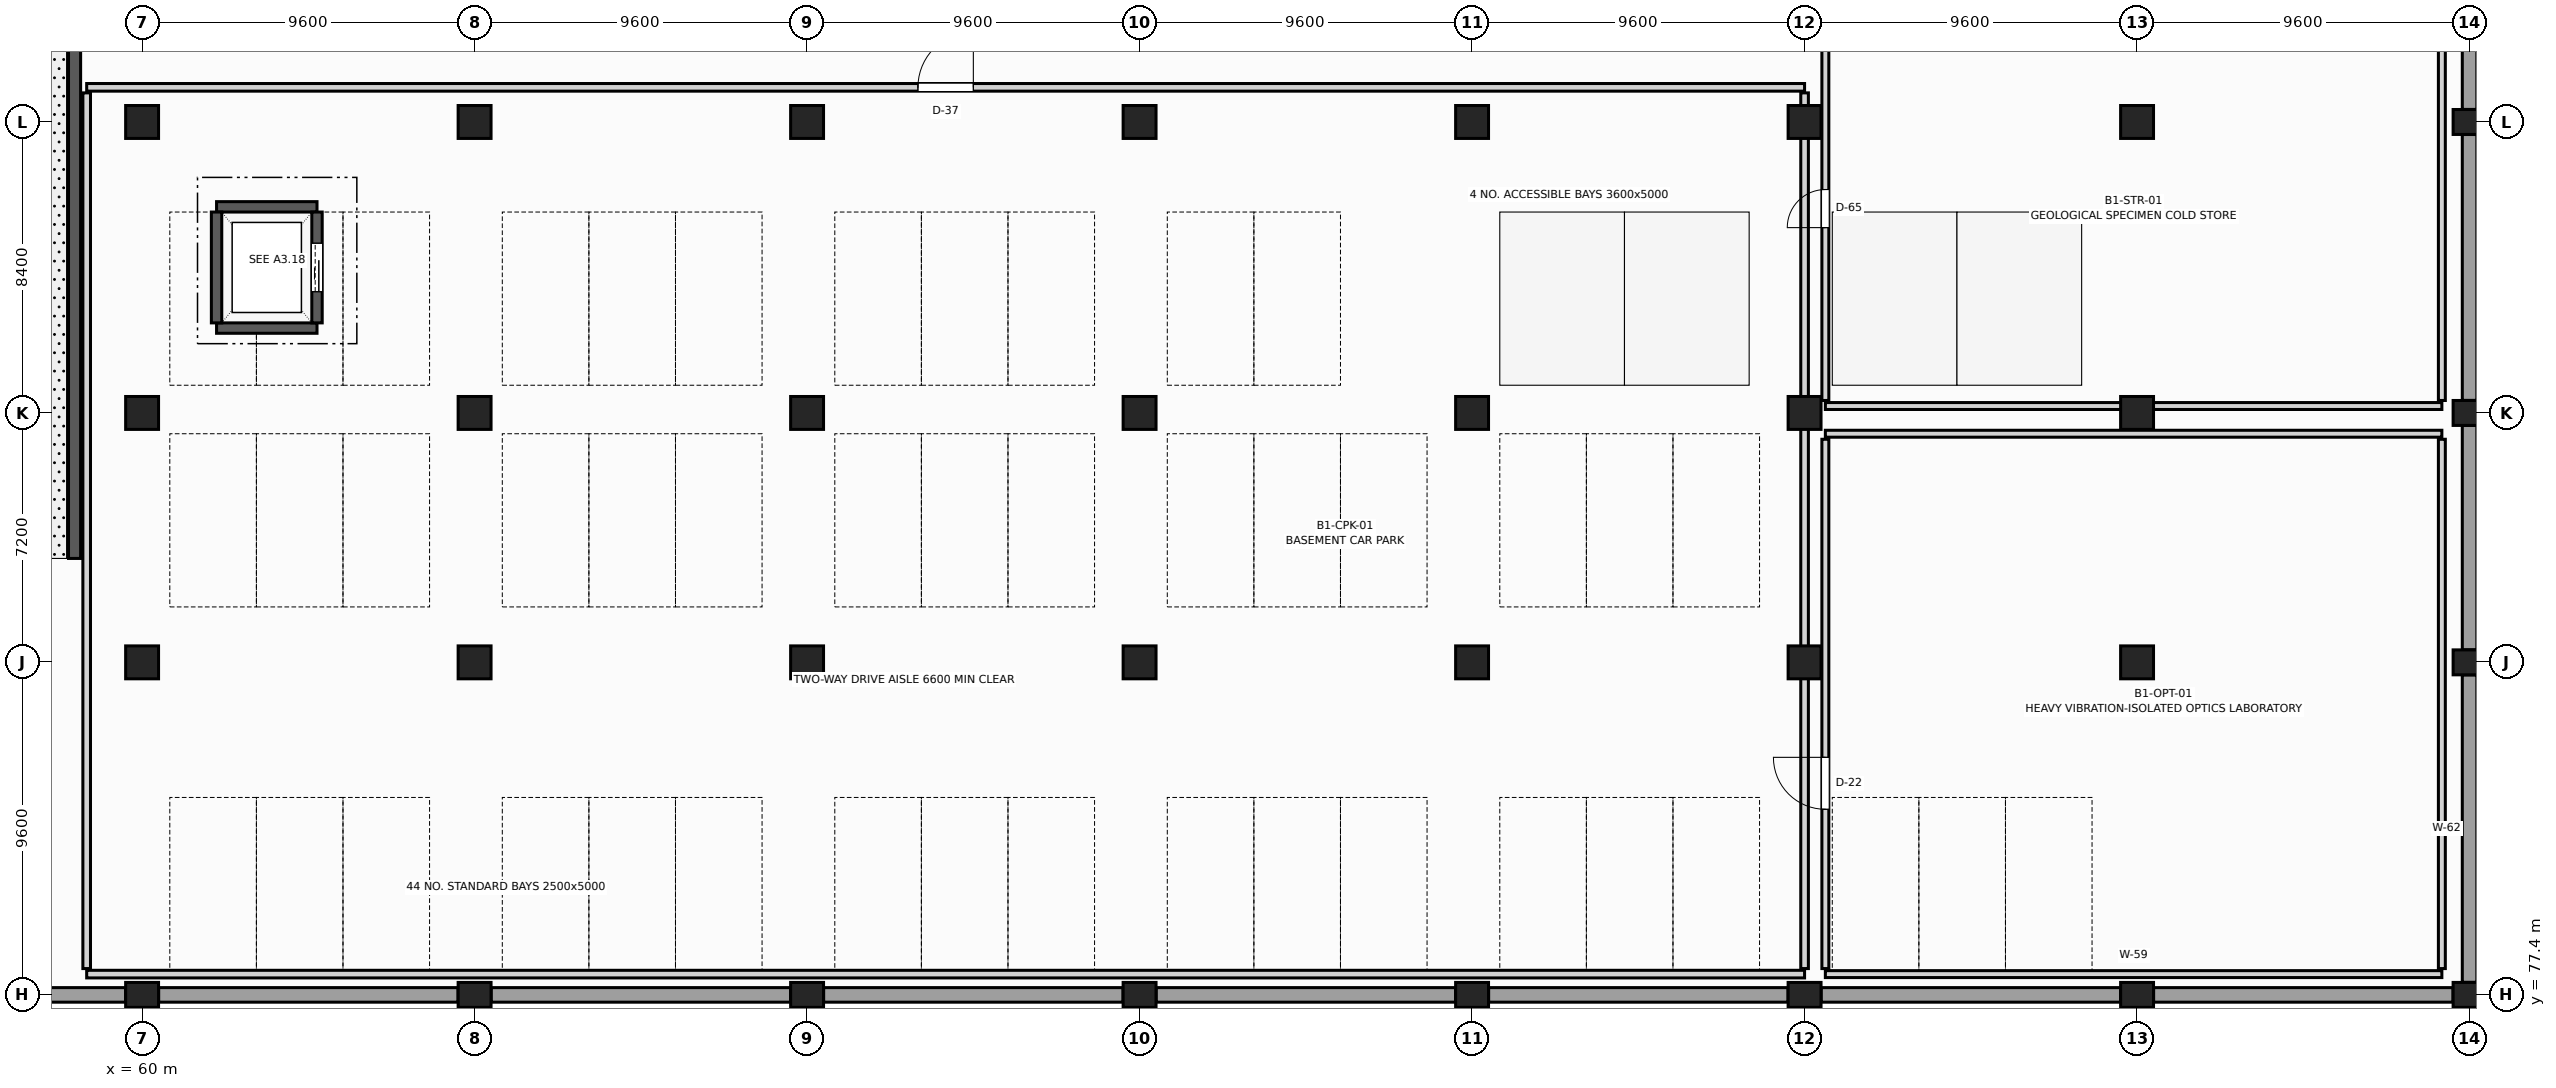
"""IFC4 building model, lengths in metres.
Left out: names, types, materials, properties, quantities, classifications, styles, units other than length and angle.
Written with IfcOpenShell. Run it as: python <this file> out.ifc"""

import sys

from ifc_helpers import new_model, si_unit, direction, frame, frame_2d, origin, origin_2d, place, context, subcontext, project, spatial, polyline, rectangle, outline, extrude, element, fill, save


model = new_model("IFC4")
c1 = context("Model", 3, precision=1e-05, world=origin(), true_north=direction((0.0, 1.0)))
c2 = subcontext(c1, "Body", "Model", "MODEL_VIEW")
j1 = project(units=[si_unit("LENGTHUNIT", "METRE"), si_unit("PLANEANGLEUNIT", "RADIAN")], contexts=[c1])
p1 = place(None, origin())
s1 = spatial("IfcSite", under=j1, at=p1, CompositionType="ELEMENT")
p2 = place(p1, origin())
s2 = spatial("IfcBuilding", under=s1, at=p2, CompositionType="ELEMENT")
p3 = place(p2, frame((0.0, 0.0, -4.5)))
s3 = spatial("IfcBuildingStorey", under=s2, at=p3, CompositionType="ELEMENT", Elevation=-4.5)
p4 = place(p3, frame((58.05, 90.0, 0.0), z_axis=(0.0, 0.0, 1.0), x_axis=(0.0, 1.0, 0.0)))
e1 = element("IfcWall", 1, at=p4, inside=s3, PredefinedType="SHEAR", context=c2, shape_type="SweptSolid", body=[
    extrude(outline(polyline([(0.0, 0.0), (27.0, 0.0), (27.0, 4.12), (0.0, 0.0), (0.0, 0.0)])), frame((0.0, 0.175, 0.0), z_axis=(0.0, -1.0, 0.0), x_axis=(1.0, 0.0, 0.0)), (0.0, 0.0, 1.0), 0.35),
])
p5 = place(p3, frame((60.0, 77.4, 0.0), z_axis=(0.0, 0.0, 1.0), x_axis=(1.0, 0.0, 0.0)))
e2 = element("IfcColumn", 2, at=p5, inside=s3, PredefinedType="COLUMN", context=c2, shape_type="SweptSolid", body=[
    extrude(rectangle(XDim=0.95, YDim=0.72, at=origin_2d()), origin(), (0.0, 0.0, 1.0), 4.14),
])
for number, where, z_axis, x_axis in (
    (3, (60.0, 87.0, 0.0), (0.0, 0.0, 1.0), (1.0, 0.0, 0.0)),
    (4, (60.0, 94.2, 0.0), (0.0, 0.0, 1.0), (1.0, 0.0, 0.0)),
    (5, (60.0, 102.6, 0.0), (0.0, 0.0, 1.0), (1.0, 0.0, 0.0)),
):
    element("IfcColumn", number, at=place(p3, frame(where, z_axis=z_axis, x_axis=x_axis)), inside=s3, PredefinedType="COLUMN", context=c2, shape_type="SweptSolid", body=[
        extrude(rectangle(XDim=0.95, YDim=0.95, at=origin_2d()), origin(), (0.0, 0.0, 1.0), 4.14),
    ])
p6 = place(p3, frame((69.6, 77.4, 0.0), z_axis=(0.0, 0.0, 1.0), x_axis=(1.0, 0.0, 0.0)))
e6 = element("IfcColumn", 6, at=p6, inside=s3, PredefinedType="COLUMN", context=c2, shape_type="SweptSolid", body=[
    extrude(rectangle(XDim=0.95, YDim=0.72, at=origin_2d()), origin(), (0.0, 0.0, 1.0), 4.14),
])
for number, where, z_axis, x_axis in (
    (7, (69.6, 87.0, 0.0), (0.0, 0.0, 1.0), (1.0, 0.0, 0.0)),
    (8, (69.6, 94.2, 0.0), (0.0, 0.0, 1.0), (1.0, 0.0, 0.0)),
    (9, (69.6, 102.6, 0.0), (0.0, 0.0, 1.0), (1.0, 0.0, 0.0)),
):
    element("IfcColumn", number, at=place(p3, frame(where, z_axis=z_axis, x_axis=x_axis)), inside=s3, PredefinedType="COLUMN", context=c2, shape_type="SweptSolid", body=[
        extrude(rectangle(XDim=0.95, YDim=0.95, at=origin_2d()), origin(), (0.0, 0.0, 1.0), 4.14),
    ])
p7 = place(p3, frame((79.2, 77.4, 0.0), z_axis=(0.0, 0.0, 1.0), x_axis=(1.0, 0.0, 0.0)))
e10 = element("IfcColumn", 10, at=p7, inside=s3, PredefinedType="COLUMN", context=c2, shape_type="SweptSolid", body=[
    extrude(rectangle(XDim=0.95, YDim=0.72, at=origin_2d()), origin(), (0.0, 0.0, 1.0), 4.14),
])
for number, where, z_axis, x_axis in (
    (11, (79.2, 87.0, 0.0), (0.0, 0.0, 1.0), (1.0, 0.0, 0.0)),
    (12, (79.2, 94.2, 0.0), (0.0, 0.0, 1.0), (1.0, 0.0, 0.0)),
    (13, (79.2, 102.6, 0.0), (0.0, 0.0, 1.0), (1.0, 0.0, 0.0)),
):
    element("IfcColumn", number, at=place(p3, frame(where, z_axis=z_axis, x_axis=x_axis)), inside=s3, PredefinedType="COLUMN", context=c2, shape_type="SweptSolid", body=[
        extrude(rectangle(XDim=0.95, YDim=0.95, at=origin_2d()), origin(), (0.0, 0.0, 1.0), 4.14),
    ])
p8 = place(p3, frame((88.8, 77.4, 0.0), z_axis=(0.0, 0.0, 1.0), x_axis=(1.0, 0.0, 0.0)))
e14 = element("IfcColumn", 14, at=p8, inside=s3, PredefinedType="COLUMN", context=c2, shape_type="SweptSolid", body=[
    extrude(rectangle(XDim=0.95, YDim=0.72, at=origin_2d()), origin(), (0.0, 0.0, 1.0), 4.14),
])
for number, where, z_axis, x_axis in (
    (15, (88.8, 87.0, 0.0), (0.0, 0.0, 1.0), (1.0, 0.0, 0.0)),
    (16, (88.8, 94.2, 0.0), (0.0, 0.0, 1.0), (1.0, 0.0, 0.0)),
    (17, (88.8, 102.6, 0.0), (0.0, 0.0, 1.0), (1.0, 0.0, 0.0)),
):
    element("IfcColumn", number, at=place(p3, frame(where, z_axis=z_axis, x_axis=x_axis)), inside=s3, PredefinedType="COLUMN", context=c2, shape_type="SweptSolid", body=[
        extrude(rectangle(XDim=0.95, YDim=0.95, at=origin_2d()), origin(), (0.0, 0.0, 1.0), 4.14),
    ])
p9 = place(p3, frame((98.4, 77.4, 0.0), z_axis=(0.0, 0.0, 1.0), x_axis=(1.0, 0.0, 0.0)))
e18 = element("IfcColumn", 18, at=p9, inside=s3, PredefinedType="COLUMN", context=c2, shape_type="SweptSolid", body=[
    extrude(rectangle(XDim=0.95, YDim=0.72, at=origin_2d()), origin(), (0.0, 0.0, 1.0), 4.14),
])
for number, where, z_axis, x_axis in (
    (19, (98.4, 87.0, 0.0), (0.0, 0.0, 1.0), (1.0, 0.0, 0.0)),
    (20, (98.4, 94.2, 0.0), (0.0, 0.0, 1.0), (1.0, 0.0, 0.0)),
    (21, (98.4, 102.6, 0.0), (0.0, 0.0, 1.0), (1.0, 0.0, 0.0)),
):
    element("IfcColumn", number, at=place(p3, frame(where, z_axis=z_axis, x_axis=x_axis)), inside=s3, PredefinedType="COLUMN", context=c2, shape_type="SweptSolid", body=[
        extrude(rectangle(XDim=0.95, YDim=0.95, at=origin_2d()), origin(), (0.0, 0.0, 1.0), 4.14),
    ])
p10 = place(p3, frame((108.0, 77.4, 0.0), z_axis=(0.0, 0.0, 1.0), x_axis=(1.0, 0.0, 0.0)))
e22 = element("IfcColumn", 22, at=p10, inside=s3, PredefinedType="COLUMN", context=c2, shape_type="SweptSolid", body=[
    extrude(rectangle(XDim=0.95, YDim=0.72, at=origin_2d()), origin(), (0.0, 0.0, 1.0), 4.14),
])
for number, where, z_axis, x_axis in (
    (23, (108.0, 87.0, 0.0), (0.0, 0.0, 1.0), (1.0, 0.0, 0.0)),
    (24, (108.0, 94.2, 0.0), (0.0, 0.0, 1.0), (1.0, 0.0, 0.0)),
    (25, (108.0, 102.6, 0.0), (0.0, 0.0, 1.0), (1.0, 0.0, 0.0)),
):
    element("IfcColumn", number, at=place(p3, frame(where, z_axis=z_axis, x_axis=x_axis)), inside=s3, PredefinedType="COLUMN", context=c2, shape_type="SweptSolid", body=[
        extrude(rectangle(XDim=0.95, YDim=0.95, at=origin_2d()), origin(), (0.0, 0.0, 1.0), 4.14),
    ])
p11 = place(p3, frame((117.6, 77.4, 0.0), z_axis=(0.0, 0.0, 1.0), x_axis=(1.0, 0.0, 0.0)))
e26 = element("IfcColumn", 26, at=p11, inside=s3, PredefinedType="COLUMN", context=c2, shape_type="SweptSolid", body=[
    extrude(rectangle(XDim=0.95, YDim=0.72, at=origin_2d()), origin(), (0.0, 0.0, 1.0), 4.14),
])
for number, where, z_axis, x_axis in (
    (27, (117.6, 87.0, 0.0), (0.0, 0.0, 1.0), (1.0, 0.0, 0.0)),
    (28, (117.6, 94.2, 0.0), (0.0, 0.0, 1.0), (1.0, 0.0, 0.0)),
    (29, (117.6, 102.6, 0.0), (0.0, 0.0, 1.0), (1.0, 0.0, 0.0)),
):
    element("IfcColumn", number, at=place(p3, frame(where, z_axis=z_axis, x_axis=x_axis)), inside=s3, PredefinedType="COLUMN", context=c2, shape_type="SweptSolid", body=[
        extrude(rectangle(XDim=0.95, YDim=0.95, at=origin_2d()), origin(), (0.0, 0.0, 1.0), 4.14),
    ])
for number, where, z_axis, x_axis in (
    (30, (127.2, 77.4, 0.0), (0.0, 0.0, 1.0), (1.0, 0.0, 0.0)),
    (31, (127.2, 87.0, 0.0), (0.0, 0.0, 1.0), (1.0, 0.0, 0.0)),
):
    element("IfcColumn", number, at=place(p3, frame(where, z_axis=z_axis, x_axis=x_axis)), inside=s3, PredefinedType="COLUMN", context=c2, shape_type="SweptSolid", body=[
        extrude(rectangle(XDim=0.95, YDim=0.72, at=origin_2d()), origin(), (0.0, 0.0, 1.0), 4.14),
    ])
for number, where, z_axis, x_axis in (
    (32, (127.2, 94.2, 0.0), (0.0, 0.0, 1.0), (1.0, 0.0, 0.0)),
    (33, (127.2, 102.6, 0.0), (0.0, 0.0, 1.0), (1.0, 0.0, 0.0)),
):
    element("IfcColumn", number, at=place(p3, frame(where, z_axis=z_axis, x_axis=x_axis)), inside=s3, PredefinedType="COLUMN", context=c2, shape_type="SweptSolid", body=[
        extrude(rectangle(XDim=0.95, YDim=0.72, at=origin_2d()), origin(), (0.0, 0.0, 1.0), 4.28),
    ])
p12 = place(p3, frame((127.2, 77.762, 0.0), z_axis=(0.0, 0.0, 1.0), x_axis=(0.0, 1.0, 0.0)))
e34 = element("IfcWall", 34, at=p12, inside=s3, PredefinedType="SOLIDWALL", context=c2, shape_type="SweptSolid", body=[
    extrude(rectangle(XDim=8.876, YDim=0.42, at=frame_2d((4.438, 0.0))), origin(), (0.0, 0.0, 1.0), 4.135),
])
p13 = place(p3, frame((127.2, 87.362, 0.0), z_axis=(0.0, 0.0, 1.0), x_axis=(0.0, 1.0, 0.0)))
e35 = element("IfcWall", 35, at=p13, inside=s3, PredefinedType="SOLIDWALL", context=c2, shape_type="SweptSolid", body=[
    extrude(rectangle(XDim=6.476, YDim=0.42, at=frame_2d((3.238, 0.0))), origin(), (0.0, 0.0, 1.0), 4.135),
])
for number, where, z_axis, x_axis in (
    (36, (127.2, 94.562, 0.0), (0.0, 0.0, 1.0), (0.0, 1.0, 0.0)),
    (37, (127.2, 102.962, 0.0), (0.0, 0.0, 1.0), (0.0, 1.0, 0.0)),
):
    element("IfcWall", number, at=place(p3, frame(where, z_axis=z_axis, x_axis=x_axis)), inside=s3, PredefinedType="SOLIDWALL", context=c2, shape_type="SweptSolid", body=[
        extrude(rectangle(XDim=7.676, YDim=0.42, at=frame_2d((3.838, 0.0))), origin(), (0.0, 0.0, 1.0), 4.135),
    ])
for number, where, z_axis, x_axis in (
    (38, (50.877, 77.4, 0.0), (0.0, 0.0, 1.0), (1.0, 0.0, 0.0)),
    (39, (60.477, 77.4, 0.0), (0.0, 0.0, 1.0), (1.0, 0.0, 0.0)),
    (40, (70.077, 77.4, 0.0), (0.0, 0.0, 1.0), (1.0, 0.0, 0.0)),
    (41, (79.677, 77.4, 0.0), (0.0, 0.0, 1.0), (1.0, 0.0, 0.0)),
    (42, (89.277, 77.4, 0.0), (0.0, 0.0, 1.0), (1.0, 0.0, 0.0)),
    (43, (98.877, 77.4, 0.0), (0.0, 0.0, 1.0), (1.0, 0.0, 0.0)),
    (44, (108.477, 77.4, 0.0), (0.0, 0.0, 1.0), (1.0, 0.0, 0.0)),
    (45, (118.077, 77.4, 0.0), (0.0, 0.0, 1.0), (1.0, 0.0, 0.0)),
):
    element("IfcWall", number, at=place(p3, frame(where, z_axis=z_axis, x_axis=x_axis)), inside=s3, PredefinedType="SOLIDWALL", context=c2, shape_type="SweptSolid", body=[
        extrude(rectangle(XDim=8.646, YDim=0.42, at=frame_2d((4.323, 0.0))), origin(), (0.0, 0.0, 1.0), 4.135),
    ])
for number, where, z_axis, x_axis in (
    (46, (62.15, 96.65, 0.0), (0.0, 0.0, 1.0), (1.0, 0.0, 0.0)),
    (47, (62.15, 100.15, 0.0), (0.0, 0.0, 1.0), (1.0, 0.0, 0.0)),
):
    element("IfcWall", number, at=place(p3, frame(where, z_axis=z_axis, x_axis=x_axis)), inside=s3, PredefinedType="SHEAR", context=c2, shape_type="SweptSolid", body=[
        extrude(rectangle(XDim=2.9, YDim=0.3, at=frame_2d((1.45, 0.0))), origin(), (0.0, 0.0, 1.0), 4.14),
    ])
p14 = place(p3, frame((62.15, 96.8, 0.0), z_axis=(0.0, 0.0, 1.0), x_axis=(0.0, 1.0, 0.0)))
e48 = element("IfcWall", 48, at=p14, inside=s3, PredefinedType="SHEAR", context=c2, shape_type="SweptSolid", body=[
    extrude(rectangle(XDim=3.2, YDim=0.3, at=frame_2d((1.6, 0.0))), origin(), (0.0, 0.0, 1.0), 4.14),
])
p15 = place(p3, frame((65.05, 96.8, 0.0), z_axis=(0.0, 0.0, 1.0), x_axis=(0.0, 1.0, 0.0)))
e49 = element("IfcWall", 49, at=p15, inside=s3, PredefinedType="SHEAR", context=c2, shape_type="SweptSolid", body=[
    extrude(rectangle(XDim=3.2, YDim=0.3, at=frame_2d((1.6, 0.0))), origin(), (0.0, 0.0, 1.0), 4.14),
])
p16 = place(p15, frame((0.9, 0.0, 0.0)))
e50 = element("IfcOpeningElement", 50, at=p16, cuts=e49, PredefinedType="OPENING", context=c2, shape_type="SweptSolid", body=[
    extrude(rectangle(XDim=1.4, YDim=2.3, at=frame_2d((0.7, 1.15))), frame((0.0, 0.16, 0.0), z_axis=(0.0, -1.0, 0.0), x_axis=(1.0, 0.0, 0.0)), (0.0, 0.0, 1.0), 0.32),
])
for number, where, z_axis, x_axis in (
    (51, (108.6, 78.0, 0.0), (0.0, 0.0, 1.0), (1.0, 0.0, 0.0)),
    (52, (108.6, 93.6, 0.0), (0.0, 0.0, 1.0), (1.0, 0.0, 0.0)),
):
    element("IfcWall", number, at=place(p3, frame(where, z_axis=z_axis, x_axis=x_axis)), inside=s3, PredefinedType="PARTITIONING", context=c2, shape_type="SweptSolid", body=[
        extrude(rectangle(XDim=17.8, YDim=0.2, at=frame_2d((8.9, 0.0))), origin(), (0.0, 0.0, 1.0), 3.22),
    ])
p17 = place(p3, frame((108.6, 78.16, 0.0), z_axis=(0.0, 0.0, 1.0), x_axis=(0.0, 1.0, 0.0)))
e53 = element("IfcWall", 53, at=p17, inside=s3, PredefinedType="PARTITIONING", context=c2, shape_type="SweptSolid", body=[
    extrude(rectangle(XDim=15.28, YDim=0.2, at=frame_2d((7.64, 0.0))), origin(), (0.0, 0.0, 1.0), 3.22),
])
p18 = place(p17, frame((4.598, 0.0, 0.0)))
e54 = element("IfcOpeningElement", 54, at=p18, cuts=e53, PredefinedType="OPENING", context=c2, shape_type="SweptSolid", body=[
    extrude(rectangle(XDim=1.5, YDim=2.2, at=frame_2d((0.75, 1.1))), frame((0.0, 0.11, 0.0), z_axis=(0.0, -1.0, 0.0), x_axis=(1.0, 0.0, 0.0)), (0.0, 0.0, 1.0), 0.22),
])
p19 = place(p3, frame((126.4, 78.16, 0.0), z_axis=(0.0, 0.0, 1.0), x_axis=(0.0, 1.0, 0.0)))
e55 = element("IfcWall", 55, at=p19, inside=s3, PredefinedType="PARTITIONING", context=c2, shape_type="SweptSolid", body=[
    extrude(rectangle(XDim=15.28, YDim=0.2, at=frame_2d((7.64, 0.0))), origin(), (0.0, 0.0, 1.0), 3.22),
])
p20 = place(p3, frame((108.6, 94.4, 0.0), z_axis=(0.0, 0.0, 1.0), x_axis=(1.0, 0.0, 0.0)))
e56 = element("IfcWall", 56, at=p20, inside=s3, PredefinedType="PARTITIONING", context=c2, shape_type="SweptSolid", body=[
    extrude(rectangle(XDim=17.8, YDim=0.2, at=frame_2d((8.9, 0.0))), origin(), (0.0, 0.0, 1.0), 3.22),
])
p21 = place(p3, frame((108.6, 94.56, 0.0), z_axis=(0.0, 0.0, 1.0), x_axis=(0.0, 1.0, 0.0)))
e57 = element("IfcWall", 57, at=p21, inside=s3, PredefinedType="PARTITIONING", context=c2, shape_type="SweptSolid", body=[
    extrude(rectangle(XDim=11.08, YDim=0.2, at=frame_2d((5.54, 0.0))), origin(), (0.0, 0.0, 1.0), 3.22),
])
p22 = place(p21, frame((4.99, 0.0, 0.0)))
e58 = element("IfcOpeningElement", 58, at=p22, cuts=e57, PredefinedType="OPENING", context=c2, shape_type="SweptSolid", body=[
    extrude(rectangle(XDim=1.1, YDim=2.2, at=frame_2d((0.55, 1.1))), frame((0.0, 0.11, 0.0), z_axis=(0.0, -1.0, 0.0), x_axis=(1.0, 0.0, 0.0)), (0.0, 0.0, 1.0), 0.22),
])
p23 = place(p3, frame((126.4, 94.56, 0.0), z_axis=(0.0, 0.0, 1.0), x_axis=(0.0, 1.0, 0.0)))
e59 = element("IfcWall", 59, at=p23, inside=s3, PredefinedType="PARTITIONING", context=c2, shape_type="SweptSolid", body=[
    extrude(rectangle(XDim=11.08, YDim=0.2, at=frame_2d((5.54, 0.0))), origin(), (0.0, 0.0, 1.0), 3.22),
])
p24 = place(p3, frame((58.4, 78.0, 0.0), z_axis=(0.0, 0.0, 1.0), x_axis=(1.0, 0.0, 0.0)))
e60 = element("IfcWall", 60, at=p24, inside=s3, PredefinedType="PARTITIONING", context=c2, shape_type="SweptSolid", body=[
    extrude(rectangle(XDim=49.6, YDim=0.22, at=frame_2d((24.8, 0.0))), origin(), (0.0, 0.0, 1.0), 3.22),
])
p25 = place(p3, frame((58.4, 103.6, 0.0), z_axis=(0.0, 0.0, 1.0), x_axis=(1.0, 0.0, 0.0)))
e61 = element("IfcWall", 61, at=p25, inside=s3, PredefinedType="PARTITIONING", context=c2, shape_type="SweptSolid", body=[
    extrude(rectangle(XDim=49.6, YDim=0.22, at=frame_2d((24.8, 0.0))), origin(), (0.0, 0.0, 1.0), 3.22),
])
p26 = place(p25, frame((24.0, 0.0, 0.0)))
e62 = element("IfcOpeningElement", 62, at=p26, cuts=e61, PredefinedType="OPENING", context=c2, shape_type="SweptSolid", body=[
    extrude(rectangle(XDim=1.6, YDim=2.3, at=frame_2d((0.8, 1.15))), frame((0.0, 0.12, 0.0), z_axis=(0.0, -1.0, 0.0), x_axis=(1.0, 0.0, 0.0)), (0.0, 0.0, 1.0), 0.24),
])
for number, where, z_axis, x_axis in (
    (63, (58.4, 78.16, 0.0), (0.0, 0.0, 1.0), (0.0, 1.0, 0.0)),
    (64, (108.0, 78.16, 0.0), (0.0, 0.0, 1.0), (0.0, 1.0, 0.0)),
):
    element("IfcWall", number, at=place(p3, frame(where, z_axis=z_axis, x_axis=x_axis)), inside=s3, PredefinedType="PARTITIONING", context=c2, shape_type="SweptSolid", body=[
        extrude(rectangle(XDim=25.28, YDim=0.22, at=frame_2d((12.64, 0.0))), origin(), (0.0, 0.0, 1.0), 3.22),
    ])
p27 = place(p16, origin())
e65 = element("IfcDoor", 65, at=p27, inside=s3, OperationType="SLIDING_TO_LEFT", PredefinedType="DOOR", context=c2, shape_type="SweptSolid", body=[
    extrude(rectangle(XDim=1.4, YDim=2.3, at=frame_2d((0.7, 1.15))), frame((0.0, 0.025, 0.0), z_axis=(0.0, -1.0, 0.0), x_axis=(1.0, 0.0, 0.0)), (0.0, 0.0, 1.0), 0.05),
])
fill(e50, e65)
p28 = place(p18, origin())
e66 = element("IfcDoor", 66, at=p28, inside=s3, OperationType="SINGLE_SWING_RIGHT", PredefinedType="DOOR", context=c2, shape_type="SweptSolid", body=[
    extrude(rectangle(XDim=1.5, YDim=2.2, at=frame_2d((0.75, 1.1))), frame((0.0, 0.025, 0.0), z_axis=(0.0, -1.0, 0.0), x_axis=(1.0, 0.0, 0.0)), (0.0, 0.0, 1.0), 0.05),
])
fill(e54, e66)
p29 = place(p22, origin())
e67 = element("IfcDoor", 67, at=p29, inside=s3, OperationType="SINGLE_SWING_LEFT", PredefinedType="DOOR", context=c2, shape_type="SweptSolid", body=[
    extrude(rectangle(XDim=1.1, YDim=2.2, at=frame_2d((0.55, 1.1))), frame((0.0, 0.025, 0.0), z_axis=(0.0, -1.0, 0.0), x_axis=(1.0, 0.0, 0.0)), (0.0, 0.0, 1.0), 0.05),
])
fill(e58, e67)
p30 = place(p26, origin())
e68 = element("IfcDoor", 68, at=p30, inside=s3, OperationType="SINGLE_SWING_RIGHT", PredefinedType="DOOR", context=c2, shape_type="SweptSolid", body=[
    extrude(rectangle(XDim=1.6, YDim=2.3, at=frame_2d((0.8, 1.15))), frame((0.0, 0.025, 0.0), z_axis=(0.0, -1.0, 0.0), x_axis=(1.0, 0.0, 0.0)), (0.0, 0.0, 1.0), 0.05),
])
fill(e62, e68)
save(model, sys.argv[1])
